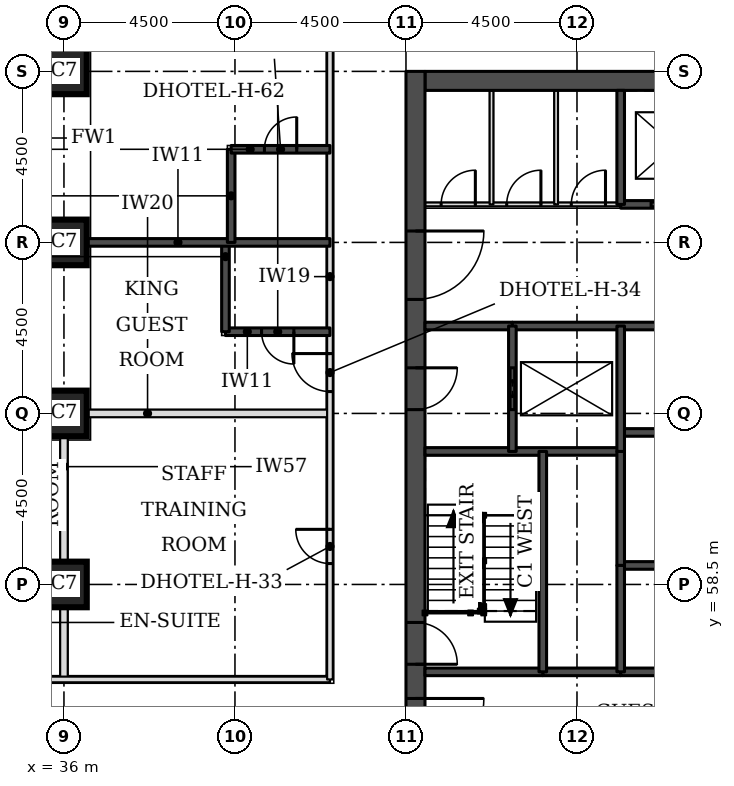
"""IFC4 building model, lengths in metres.
Left out: names, types, materials, properties, quantities, classifications, styles, units other than length and angle.
Written with IfcOpenShell. Run it as: python <this file> out.ifc"""

import sys

from ifc_helpers import new_model, si_unit, direction, frame, frame_2d, origin, origin_2d, place, context, subcontext, project, spatial, rectangle, extrude, element, fill, save


model = new_model("IFC4")
c1 = context("Model", 3, precision=1e-05, world=origin(), true_north=direction((0.0, 1.0)))
c2 = subcontext(c1, "Body", "Model", "MODEL_VIEW")
j1 = project(units=[si_unit("LENGTHUNIT", "METRE"), si_unit("PLANEANGLEUNIT", "RADIAN")], contexts=[c1])
p1 = place(None, origin())
s1 = spatial("IfcSite", under=j1, at=p1, CompositionType="ELEMENT")
p2 = place(p1, origin())
s2 = spatial("IfcBuilding", under=s1, at=p2, CompositionType="ELEMENT")
p3 = place(p2, frame((0.0, 0.0, 46.2)))
s3 = spatial("IfcBuildingStorey", under=s2, at=p3, CompositionType="ELEMENT", Elevation=46.2)
for number, where, z_axis, x_axis in (
    (1, (36.0, 58.5, 0.0), (0.0, 0.0, 1.0), (1.0, 0.0, 0.0)),
    (2, (36.0, 63.0, 0.0), (0.0, 0.0, 1.0), (1.0, 0.0, 0.0)),
    (3, (36.0, 67.5, 0.0), (0.0, 0.0, 1.0), (1.0, 0.0, 0.0)),
    (4, (36.0, 72.0, 0.0), (0.0, 0.0, 1.0), (1.0, 0.0, 0.0)),
):
    element("IfcColumn", number, at=place(p3, frame(where, z_axis=z_axis, x_axis=x_axis)), inside=s3, PredefinedType="COLUMN", context=c2, shape_type="SweptSolid", body=[
        extrude(rectangle(XDim=1.2, YDim=1.2, at=origin_2d()), origin(), (0.0, 0.0, 1.0), 3.3),
    ])
p4 = place(p3, frame((45.5, 71.75, 0.0), z_axis=(0.0, 0.0, 1.0), x_axis=(1.0, 0.0, 0.0)))
e5 = element("IfcWall", 5, at=p4, inside=s3, PredefinedType="SHEAR", context=c2, shape_type="SweptSolid", body=[
    extrude(rectangle(XDim=21.5, YDim=0.5, at=frame_2d((10.75, 0.0))), origin(), (0.0, 0.0, 1.0), 3.3),
])
p5 = place(p3, frame((45.25, 49.5, 0.0), z_axis=(0.0, 0.0, 1.0), x_axis=(0.0, 1.0, 0.0)))
e6 = element("IfcWall", 6, at=p5, inside=s3, PredefinedType="SHEAR", context=c2, shape_type="SweptSolid", body=[
    extrude(rectangle(XDim=22.5, YDim=0.5, at=frame_2d((11.25, 0.0))), origin(), (0.0, 0.0, 1.0), 3.3),
])
p6 = place(p5, frame((4.2, 0.0, 0.0)))
e7 = element("IfcOpeningElement", 7, at=p6, cuts=e6, PredefinedType="OPENING", context=c2, shape_type="SweptSolid", body=[
    extrude(rectangle(XDim=1.8, YDim=2.1, at=frame_2d((0.9, 1.05))), frame((0.0, 0.26, 0.0), z_axis=(0.0, -1.0, 0.0), x_axis=(1.0, 0.0, 0.0)), (0.0, 0.0, 1.0), 0.52),
])
p7 = place(p5, frame((6.9, 0.0, 0.0)))
e8 = element("IfcOpeningElement", 8, at=p7, cuts=e6, PredefinedType="OPENING", context=c2, shape_type="SweptSolid", body=[
    extrude(rectangle(XDim=1.1, YDim=2.1, at=frame_2d((0.55, 1.05))), frame((0.0, 0.26, 0.0), z_axis=(0.0, -1.0, 0.0), x_axis=(1.0, 0.0, 0.0)), (0.0, 0.0, 1.0), 0.52),
])
p8 = place(p5, frame((13.6, 0.0, 0.0)))
e9 = element("IfcOpeningElement", 9, at=p8, cuts=e6, PredefinedType="OPENING", context=c2, shape_type="SweptSolid", body=[
    extrude(rectangle(XDim=1.1, YDim=2.1, at=frame_2d((0.55, 1.05))), frame((0.0, 0.26, 0.0), z_axis=(0.0, -1.0, 0.0), x_axis=(1.0, 0.0, 0.0)), (0.0, 0.0, 1.0), 0.52),
])
p9 = place(p5, frame((16.5, 0.0, 0.0)))
e10 = element("IfcOpeningElement", 10, at=p9, cuts=e6, PredefinedType="OPENING", context=c2, shape_type="SweptSolid", body=[
    extrude(rectangle(XDim=1.8, YDim=2.1, at=frame_2d((0.9, 1.05))), frame((0.0, 0.26, 0.0), z_axis=(0.0, -1.0, 0.0), x_axis=(1.0, 0.0, 0.0)), (0.0, 0.0, 1.0), 0.52),
])
p10 = place(p3, frame((36.0, 56.0, 0.0), z_axis=(0.0, 0.0, 1.0), x_axis=(0.0, 1.0, 0.0)))
e11 = element("IfcWall", 11, at=p10, inside=s3, PredefinedType="PARTITIONING", context=c2, shape_type="SweptSolid", body=[
    extrude(rectangle(XDim=6.4, YDim=0.2, at=frame_2d((3.2, 0.0))), origin(), (0.0, 0.0, 1.0), 2.33),
])
p11 = place(p3, frame((36.6, 63.0, 0.0), z_axis=(0.0, 0.0, 1.0), x_axis=(1.0, 0.0, 0.0)))
e12 = element("IfcWall", 12, at=p11, inside=s3, PredefinedType="PARTITIONING", context=c2, shape_type="SweptSolid", body=[
    extrude(rectangle(XDim=6.4, YDim=0.2, at=frame_2d((3.2, 0.0))), origin(), (0.0, 0.0, 1.0), 3.08),
])
p12 = place(p3, frame((27.0, 56.0, 0.0), z_axis=(0.0, 0.0, 1.0), x_axis=(1.0, 0.0, 0.0)))
e13 = element("IfcWall", 13, at=p12, inside=s3, PredefinedType="PARTITIONING", context=c2, shape_type="SweptSolid", body=[
    extrude(rectangle(XDim=16.0, YDim=0.15, at=frame_2d((8.0, 0.0))), origin(), (0.0, 0.0, 1.0), 3.08),
])
p13 = place(p12, frame((7.425, 0.0, 0.0)))
e14 = element("IfcOpeningElement", 14, at=p13, cuts=e13, PredefinedType="OPENING", context=c2, shape_type="SweptSolid", body=[
    extrude(rectangle(XDim=1.0, YDim=2.1, at=frame_2d((0.5, 1.05))), frame((0.0, 0.085, 0.0), z_axis=(0.0, -1.0, 0.0), x_axis=(1.0, 0.0, 0.0)), (0.0, 0.0, 1.0), 0.17),
])
p14 = place(p12, frame((1.91, 0.0, 0.0)))
e15 = element("IfcOpeningElement", 15, at=p14, cuts=e13, PredefinedType="OPENING", context=c2, shape_type="SweptSolid", body=[
    extrude(rectangle(XDim=0.9, YDim=2.1, at=frame_2d((0.45, 1.05))), frame((0.0, 0.085, 0.0), z_axis=(0.0, -1.0, 0.0), x_axis=(1.0, 0.0, 0.0)), (0.0, 0.0, 1.0), 0.17),
])
p15 = place(p3, frame((43.0, 56.0, 0.0), z_axis=(0.0, 0.0, 1.0), x_axis=(0.0, 1.0, 0.0)))
e16 = element("IfcWall", 16, at=p15, inside=s3, PredefinedType="PARTITIONING", context=c2, shape_type="SweptSolid", body=[
    extrude(rectangle(XDim=18.0, YDim=0.15, at=frame_2d((9.0, 0.0))), origin(), (0.0, 0.0, 1.0), 3.08),
])
p16 = place(p15, frame((7.575, 0.0, 0.0)))
e17 = element("IfcOpeningElement", 17, at=p16, cuts=e16, PredefinedType="OPENING", context=c2, shape_type="SweptSolid", body=[
    extrude(rectangle(XDim=1.0, YDim=2.1, at=frame_2d((0.5, 1.05))), frame((0.0, 0.085, 0.0), z_axis=(0.0, -1.0, 0.0), x_axis=(1.0, 0.0, 0.0)), (0.0, 0.0, 1.0), 0.17),
])
p17 = place(p15, frame((16.553, 0.0, 0.0)))
e18 = element("IfcOpeningElement", 18, at=p17, cuts=e16, PredefinedType="OPENING", context=c2, shape_type="SweptSolid", body=[
    extrude(rectangle(XDim=1.0, YDim=2.1, at=frame_2d((0.5, 1.05))), frame((0.0, 0.085, 0.0), z_axis=(0.0, -1.0, 0.0), x_axis=(1.0, 0.0, 0.0)), (0.0, 0.0, 1.0), 0.17),
])
p18 = place(p15, frame((3.05, 0.0, 0.0)))
e19 = element("IfcOpeningElement", 19, at=p18, cuts=e16, PredefinedType="OPENING", context=c2, shape_type="SweptSolid", body=[
    extrude(rectangle(XDim=0.9, YDim=2.1, at=frame_2d((0.45, 1.05))), frame((0.0, 0.085, 0.0), z_axis=(0.0, -1.0, 0.0), x_axis=(1.0, 0.0, 0.0)), (0.0, 0.0, 1.0), 0.17),
])
p19 = place(p3, frame((40.25, 65.15, 0.0), z_axis=(0.0, 0.0, 1.0), x_axis=(1.0, 0.0, 0.0)))
e20 = element("IfcWall", 20, at=p19, inside=s3, PredefinedType="SOLIDWALL", context=c2, shape_type="SweptSolid", body=[
    extrude(rectangle(XDim=2.75, YDim=0.2, at=frame_2d((1.375, 0.0))), origin(), (0.0, 0.0, 1.0), 3.08),
])
p20 = place(p19, frame((0.95, 0.0, 0.0)))
e21 = element("IfcOpeningElement", 21, at=p20, cuts=e20, PredefinedType="OPENING", context=c2, shape_type="SweptSolid", body=[
    extrude(rectangle(XDim=0.85, YDim=2.1, at=frame_2d((0.425, 1.05))), frame((0.0, 0.11, 0.0), z_axis=(0.0, -1.0, 0.0), x_axis=(1.0, 0.0, 0.0)), (0.0, 0.0, 1.0), 0.22),
])
p21 = place(p3, frame((40.25, 65.15, 0.0), z_axis=(0.0, 0.0, 1.0), x_axis=(0.0, 1.0, 0.0)))
e22 = element("IfcWall", 22, at=p21, inside=s3, PredefinedType="SOLIDWALL", context=c2, shape_type="SweptSolid", body=[
    extrude(rectangle(XDim=2.35, YDim=0.2, at=frame_2d((1.175, 0.0))), origin(), (0.0, 0.0, 1.0), 3.08),
])
p22 = place(p3, frame((36.6, 67.5, 0.0), z_axis=(0.0, 0.0, 1.0), x_axis=(1.0, 0.0, 0.0)))
e23 = element("IfcWall", 23, at=p22, inside=s3, PredefinedType="SOLIDWALL", context=c2, shape_type="SweptSolid", body=[
    extrude(rectangle(XDim=6.4, YDim=0.2, at=frame_2d((3.2, 0.0))), origin(), (0.0, 0.0, 1.0), 3.08),
])
p23 = place(p3, frame((40.4, 67.5, 0.0), z_axis=(0.0, 0.0, 1.0), x_axis=(0.0, 1.0, 0.0)))
e24 = element("IfcWall", 24, at=p23, inside=s3, PredefinedType="SOLIDWALL", context=c2, shape_type="SweptSolid", body=[
    extrude(rectangle(XDim=2.45, YDim=0.2, at=frame_2d((1.225, 0.0))), origin(), (0.0, 0.0, 1.0), 3.08),
])
p24 = place(p3, frame((40.4, 69.95, 0.0), z_axis=(0.0, 0.0, 1.0), x_axis=(1.0, 0.0, 0.0)))
e25 = element("IfcWall", 25, at=p24, inside=s3, PredefinedType="SOLIDWALL", context=c2, shape_type="SweptSolid", body=[
    extrude(rectangle(XDim=2.6, YDim=0.2, at=frame_2d((1.3, 0.0))), origin(), (0.0, 0.0, 1.0), 3.08),
])
p25 = place(p24, frame((0.875, 0.0, 0.0)))
e26 = element("IfcOpeningElement", 26, at=p25, cuts=e25, PredefinedType="OPENING", context=c2, shape_type="SweptSolid", body=[
    extrude(rectangle(XDim=0.85, YDim=2.1, at=frame_2d((0.425, 1.05))), frame((0.0, 0.11, 0.0), z_axis=(0.0, -1.0, 0.0), x_axis=(1.0, 0.0, 0.0)), (0.0, 0.0, 1.0), 0.22),
])
p26 = place(p3, frame((48.6, 56.2, 0.0), z_axis=(0.0, 0.0, 1.0), x_axis=(1.0, 0.0, 0.0)))
e27 = element("IfcWall", 27, at=p26, inside=s3, PredefinedType="SOLIDWALL", context=c2, shape_type="SweptSolid", body=[
    extrude(rectangle(XDim=2.05, YDim=0.2, at=frame_2d((1.025, 0.0))), origin(), (0.0, 0.0, 1.0), 3.08),
])
p27 = place(p3, frame((45.5, 56.2, 0.0), z_axis=(0.0, 0.0, 1.0), x_axis=(1.0, 0.0, 0.0)))
e28 = element("IfcWall", 28, at=p27, inside=s3, PredefinedType="SOLIDWALL", context=c2, shape_type="SweptSolid", body=[
    extrude(rectangle(XDim=3.1, YDim=0.2, at=frame_2d((1.55, 0.0))), origin(), (0.0, 0.0, 1.0), 3.08),
])
p28 = place(p3, frame((50.65, 56.2, 0.0), z_axis=(0.0, 0.0, 1.0), x_axis=(1.0, 0.0, 0.0)))
e29 = element("IfcWall", 29, at=p28, inside=s3, PredefinedType="SOLIDWALL", context=c2, shape_type="SweptSolid", body=[
    extrude(rectangle(XDim=11.2, YDim=0.2, at=frame_2d((5.6, 0.0))), origin(), (0.0, 0.0, 1.0), 3.08),
])
p29 = place(p3, frame((50.65, 59.0, 0.0), z_axis=(0.0, 0.0, 1.0), x_axis=(1.0, 0.0, 0.0)))
e30 = element("IfcWall", 30, at=p29, inside=s3, PredefinedType="SOLIDWALL", context=c2, shape_type="SweptSolid", body=[
    extrude(rectangle(XDim=11.2, YDim=0.2, at=frame_2d((5.6, 0.0))), origin(), (0.0, 0.0, 1.0), 3.3),
])
p30 = place(p3, frame((45.5, 62.0, 0.0), z_axis=(0.0, 0.0, 1.0), x_axis=(1.0, 0.0, 0.0)))
e31 = element("IfcWall", 31, at=p30, inside=s3, PredefinedType="SOLIDWALL", context=c2, shape_type="SweptSolid", body=[
    extrude(rectangle(XDim=5.15, YDim=0.2, at=frame_2d((2.575, 0.0))), origin(), (0.0, 0.0, 1.0), 3.08),
])
p31 = place(p3, frame((50.65, 62.5, 0.0), z_axis=(0.0, 0.0, 1.0), x_axis=(1.0, 0.0, 0.0)))
e32 = element("IfcWall", 32, at=p31, inside=s3, PredefinedType="SOLIDWALL", context=c2, shape_type="SweptSolid", body=[
    extrude(rectangle(XDim=11.2, YDim=0.2, at=frame_2d((5.6, 0.0))), origin(), (0.0, 0.0, 1.0), 3.3),
])
p32 = place(p3, frame((45.5, 65.3, 0.0), z_axis=(0.0, 0.0, 1.0), x_axis=(1.0, 0.0, 0.0)))
e33 = element("IfcWall", 33, at=p32, inside=s3, PredefinedType="SOLIDWALL", context=c2, shape_type="SweptSolid", body=[
    extrude(rectangle(XDim=2.3, YDim=0.2, at=frame_2d((1.15, 0.0))), origin(), (0.0, 0.0, 1.0), 3.08),
])
p33 = place(p3, frame((47.8, 65.3, 0.0), z_axis=(0.0, 0.0, 1.0), x_axis=(1.0, 0.0, 0.0)))
e34 = element("IfcWall", 34, at=p33, inside=s3, PredefinedType="SOLIDWALL", context=c2, shape_type="SweptSolid", body=[
    extrude(rectangle(XDim=16.9, YDim=0.2, at=frame_2d((8.45, 0.0))), origin(), (0.0, 0.0, 1.0), 3.08),
])
p34 = place(p3, frame((45.5, 68.5, 0.0), z_axis=(0.0, 0.0, 1.0), x_axis=(1.0, 0.0, 0.0)))
e35 = element("IfcWall", 35, at=p34, inside=s3, PredefinedType="PARTITIONING", context=c2, shape_type="SweptSolid", body=[
    extrude(rectangle(XDim=5.15, YDim=0.1, at=frame_2d((2.575, 0.0))), origin(), (0.0, 0.0, 1.0), 3.08),
])
p35 = place(p34, frame((0.426, 0.0, 0.0)))
e36 = element("IfcOpeningElement", 36, at=p35, cuts=e35, PredefinedType="OPENING", context=c2, shape_type="SweptSolid", body=[
    extrude(rectangle(XDim=0.9, YDim=2.1, at=frame_2d((0.45, 1.05))), frame((0.0, 0.06, 0.0), z_axis=(0.0, -1.0, 0.0), x_axis=(1.0, 0.0, 0.0)), (0.0, 0.0, 1.0), 0.12),
])
p36 = place(p34, frame((2.151, 0.0, 0.0)))
e37 = element("IfcOpeningElement", 37, at=p36, cuts=e35, PredefinedType="OPENING", context=c2, shape_type="SweptSolid", body=[
    extrude(rectangle(XDim=0.9, YDim=2.1, at=frame_2d((0.45, 1.05))), frame((0.0, 0.06, 0.0), z_axis=(0.0, -1.0, 0.0), x_axis=(1.0, 0.0, 0.0)), (0.0, 0.0, 1.0), 0.12),
])
p37 = place(p34, frame((3.85, 0.0, 0.0)))
e38 = element("IfcOpeningElement", 38, at=p37, cuts=e35, PredefinedType="OPENING", context=c2, shape_type="SweptSolid", body=[
    extrude(rectangle(XDim=0.9, YDim=2.1, at=frame_2d((0.45, 1.05))), frame((0.0, 0.06, 0.0), z_axis=(0.0, -1.0, 0.0), x_axis=(1.0, 0.0, 0.0)), (0.0, 0.0, 1.0), 0.12),
])
p38 = place(p3, frame((50.65, 68.5, 0.0), z_axis=(0.0, 0.0, 1.0), x_axis=(1.0, 0.0, 0.0)))
e39 = element("IfcWall", 39, at=p38, inside=s3, PredefinedType="SOLIDWALL", context=c2, shape_type="SweptSolid", body=[
    extrude(rectangle(XDim=11.2, YDim=0.2, at=frame_2d((5.6, 0.0))), origin(), (0.0, 0.0, 1.0), 3.08),
])
p39 = place(p38, frame((0.8, 0.0, 0.0)))
e40 = element("IfcOpeningElement", 40, at=p39, cuts=e39, PredefinedType="OPENING", context=c2, shape_type="SweptSolid", body=[
    extrude(rectangle(XDim=1.2, YDim=2.1, at=frame_2d((0.6, 1.05))), frame((0.0, 0.11, 0.0), z_axis=(0.0, -1.0, 0.0), x_axis=(1.0, 0.0, 0.0)), (0.0, 0.0, 1.0), 0.22),
])
p40 = place(p38, frame((3.6, 0.0, 0.0)))
e41 = element("IfcOpeningElement", 41, at=p40, cuts=e39, PredefinedType="OPENING", context=c2, shape_type="SweptSolid", body=[
    extrude(rectangle(XDim=1.2, YDim=2.1, at=frame_2d((0.6, 1.05))), frame((0.0, 0.11, 0.0), z_axis=(0.0, -1.0, 0.0), x_axis=(1.0, 0.0, 0.0)), (0.0, 0.0, 1.0), 0.22),
])
p41 = place(p38, frame((6.4, 0.0, 0.0)))
e42 = element("IfcOpeningElement", 42, at=p41, cuts=e39, PredefinedType="OPENING", context=c2, shape_type="SweptSolid", body=[
    extrude(rectangle(XDim=1.2, YDim=2.1, at=frame_2d((0.6, 1.05))), frame((0.0, 0.11, 0.0), z_axis=(0.0, -1.0, 0.0), x_axis=(1.0, 0.0, 0.0)), (0.0, 0.0, 1.0), 0.22),
])
p42 = place(p38, frame((9.2, 0.0, 0.0)))
e43 = element("IfcOpeningElement", 43, at=p42, cuts=e39, PredefinedType="OPENING", context=c2, shape_type="SweptSolid", body=[
    extrude(rectangle(XDim=1.2, YDim=2.1, at=frame_2d((0.6, 1.05))), frame((0.0, 0.11, 0.0), z_axis=(0.0, -1.0, 0.0), x_axis=(1.0, 0.0, 0.0)), (0.0, 0.0, 1.0), 0.22),
])
p43 = place(p3, frame((47.251, 68.5, 0.0), z_axis=(0.0, 0.0, 1.0), x_axis=(0.0, 1.0, 0.0)))
e44 = element("IfcWall", 44, at=p43, inside=s3, PredefinedType="PARTITIONING", context=c2, shape_type="SweptSolid", body=[
    extrude(rectangle(XDim=3.0, YDim=0.1, at=frame_2d((1.5, 0.0))), origin(), (0.0, 0.0, 1.0), 3.08),
])
p44 = place(p3, frame((47.8, 62.0, 0.0), z_axis=(0.0, 0.0, 1.0), x_axis=(0.0, 1.0, 0.0)))
e45 = element("IfcWall", 45, at=p44, inside=s3, PredefinedType="SOLIDWALL", context=c2, shape_type="SweptSolid", body=[
    extrude(rectangle(XDim=3.3, YDim=0.2, at=frame_2d((1.65, 0.0))), origin(), (0.0, 0.0, 1.0), 3.08),
])
p45 = place(p44, frame((1.1, 0.0, 0.0)))
e46 = element("IfcOpeningElement", 46, at=p45, cuts=e45, PredefinedType="OPENING", context=c2, shape_type="SweptSolid", body=[
    extrude(rectangle(XDim=1.1, YDim=2.1, at=frame_2d((0.55, 1.05))), frame((0.0, 0.11, 0.0), z_axis=(0.0, -1.0, 0.0), x_axis=(1.0, 0.0, 0.0)), (0.0, 0.0, 1.0), 0.22),
])
p46 = place(p3, frame((48.6, 56.2, 0.0), z_axis=(0.0, 0.0, 1.0), x_axis=(0.0, 1.0, 0.0)))
e47 = element("IfcWall", 47, at=p46, inside=s3, PredefinedType="SOLIDWALL", context=c2, shape_type="SweptSolid", body=[
    extrude(rectangle(XDim=5.8, YDim=0.2, at=frame_2d((2.9, 0.0))), origin(), (0.0, 0.0, 1.0), 3.08),
])
p47 = place(p3, frame((48.95, 68.5, 0.0), z_axis=(0.0, 0.0, 1.0), x_axis=(0.0, 1.0, 0.0)))
e48 = element("IfcWall", 48, at=p47, inside=s3, PredefinedType="PARTITIONING", context=c2, shape_type="SweptSolid", body=[
    extrude(rectangle(XDim=3.0, YDim=0.1, at=frame_2d((1.5, 0.0))), origin(), (0.0, 0.0, 1.0), 3.08),
])
p48 = place(p3, frame((50.65, 59.0, 0.0), z_axis=(0.0, 0.0, 1.0), x_axis=(0.0, 1.0, 0.0)))
e49 = element("IfcWall", 49, at=p48, inside=s3, PredefinedType="SOLIDWALL", context=c2, shape_type="SweptSolid", body=[
    extrude(rectangle(XDim=3.0, YDim=0.2, at=frame_2d((1.5, 0.0))), origin(), (0.0, 0.0, 1.0), 3.3),
])
p49 = place(p3, frame((50.65, 56.2, 0.0), z_axis=(0.0, 0.0, 1.0), x_axis=(0.0, 1.0, 0.0)))
e50 = element("IfcWall", 50, at=p49, inside=s3, PredefinedType="SOLIDWALL", context=c2, shape_type="SweptSolid", body=[
    extrude(rectangle(XDim=2.8, YDim=0.2, at=frame_2d((1.4, 0.0))), origin(), (0.0, 0.0, 1.0), 3.08),
])
p50 = place(p3, frame((50.65, 62.0, 0.0), z_axis=(0.0, 0.0, 1.0), x_axis=(0.0, 1.0, 0.0)))
e51 = element("IfcWall", 51, at=p50, inside=s3, PredefinedType="SOLIDWALL", context=c2, shape_type="SweptSolid", body=[
    extrude(rectangle(XDim=3.3, YDim=0.2, at=frame_2d((1.65, 0.0))), origin(), (0.0, 0.0, 1.0), 3.08),
])
p51 = place(p3, frame((50.65, 68.5, 0.0), z_axis=(0.0, 0.0, 1.0), x_axis=(0.0, 1.0, 0.0)))
e52 = element("IfcWall", 52, at=p51, inside=s3, PredefinedType="SOLIDWALL", context=c2, shape_type="SweptSolid", body=[
    extrude(rectangle(XDim=3.0, YDim=0.2, at=frame_2d((1.5, 0.0))), origin(), (0.0, 0.0, 1.0), 3.08),
])
p52 = place(p16, origin())
e53 = element("IfcDoor", 53, at=p52, inside=s3, OperationType="SINGLE_SWING_RIGHT", PredefinedType="DOOR", context=c2, shape_type="SweptSolid", body=[
    extrude(rectangle(XDim=1.0, YDim=2.1, at=frame_2d((0.5, 1.05))), frame((0.0, 0.025, 0.0), z_axis=(0.0, -1.0, 0.0), x_axis=(1.0, 0.0, 0.0)), (0.0, 0.0, 1.0), 0.05),
])
fill(e17, e53)
p53 = place(p20, frame((0.85, 0.0, 0.0), z_axis=(0.0, 0.0, 1.0), x_axis=(-1.0, 0.0, 0.0)))
e54 = element("IfcDoor", 54, at=p53, inside=s3, OperationType="SINGLE_SWING_LEFT", PredefinedType="DOOR", context=c2, shape_type="SweptSolid", body=[
    extrude(rectangle(XDim=0.85, YDim=2.1, at=frame_2d((0.425, 1.05))), frame((0.0, 0.025, 0.0), z_axis=(0.0, -1.0, 0.0), x_axis=(1.0, 0.0, 0.0)), (0.0, 0.0, 1.0), 0.05),
])
fill(e21, e54)
p54 = place(p25, origin())
e55 = element("IfcDoor", 55, at=p54, inside=s3, OperationType="SINGLE_SWING_RIGHT", PredefinedType="DOOR", context=c2, shape_type="SweptSolid", body=[
    extrude(rectangle(XDim=0.85, YDim=2.1, at=frame_2d((0.425, 1.05))), frame((0.0, 0.025, 0.0), z_axis=(0.0, -1.0, 0.0), x_axis=(1.0, 0.0, 0.0)), (0.0, 0.0, 1.0), 0.05),
])
fill(e26, e55)
p55 = place(p18, origin())
e56 = element("IfcDoor", 56, at=p55, inside=s3, OperationType="SINGLE_SWING_RIGHT", PredefinedType="DOOR", context=c2, shape_type="SweptSolid", body=[
    extrude(rectangle(XDim=0.9, YDim=2.1, at=frame_2d((0.45, 1.05))), frame((0.0, 0.025, 0.0), z_axis=(0.0, -1.0, 0.0), x_axis=(1.0, 0.0, 0.0)), (0.0, 0.0, 1.0), 0.05),
])
fill(e19, e56)
p56 = place(p39, origin())
e57 = element("IfcDoor", 57, at=p56, inside=s3, OperationType="DOUBLE_DOOR_SLIDING", PredefinedType="DOOR", context=c2, shape_type="SweptSolid", body=[
    extrude(rectangle(XDim=1.2, YDim=2.1, at=frame_2d((0.6, 1.05))), frame((0.0, 0.025, 0.0), z_axis=(0.0, -1.0, 0.0), x_axis=(1.0, 0.0, 0.0)), (0.0, 0.0, 1.0), 0.05),
])
fill(e40, e57)
p57 = place(p45, origin())
e58 = element("IfcDoor", 58, at=p57, inside=s3, OperationType="DOUBLE_DOOR_SLIDING", PredefinedType="DOOR", context=c2, shape_type="SweptSolid", body=[
    extrude(rectangle(XDim=1.1, YDim=2.1, at=frame_2d((0.55, 1.05))), frame((0.0, 0.025, 0.0), z_axis=(0.0, -1.0, 0.0), x_axis=(1.0, 0.0, 0.0)), (0.0, 0.0, 1.0), 0.05),
])
fill(e46, e58)
p58 = place(p6, frame((1.8, 0.0, 0.0), z_axis=(0.0, 0.0, 1.0), x_axis=(-1.0, 0.0, 0.0)))
e59 = element("IfcDoor", 59, at=p58, inside=s3, OperationType="SINGLE_SWING_LEFT", PredefinedType="DOOR", context=c2, shape_type="SweptSolid", body=[
    extrude(rectangle(XDim=1.8, YDim=2.1, at=frame_2d((0.9, 1.05))), frame((0.0, 0.025, 0.0), z_axis=(0.0, -1.0, 0.0), x_axis=(1.0, 0.0, 0.0)), (0.0, 0.0, 1.0), 0.05),
])
fill(e7, e59)
p59 = place(p7, frame((1.1, 0.0, 0.0), z_axis=(0.0, 0.0, 1.0), x_axis=(-1.0, 0.0, 0.0)))
e60 = element("IfcDoor", 60, at=p59, inside=s3, OperationType="SINGLE_SWING_RIGHT", PredefinedType="DOOR", context=c2, shape_type="SweptSolid", body=[
    extrude(rectangle(XDim=1.1, YDim=2.1, at=frame_2d((0.55, 1.05))), frame((0.0, 0.025, 0.0), z_axis=(0.0, -1.0, 0.0), x_axis=(1.0, 0.0, 0.0)), (0.0, 0.0, 1.0), 0.05),
])
fill(e8, e60)
p60 = place(p8, frame((1.1, 0.0, 0.0), z_axis=(0.0, 0.0, 1.0), x_axis=(-1.0, 0.0, 0.0)))
e61 = element("IfcDoor", 61, at=p60, inside=s3, OperationType="SINGLE_SWING_LEFT", PredefinedType="DOOR", context=c2, shape_type="SweptSolid", body=[
    extrude(rectangle(XDim=1.1, YDim=2.1, at=frame_2d((0.55, 1.05))), frame((0.0, 0.025, 0.0), z_axis=(0.0, -1.0, 0.0), x_axis=(1.0, 0.0, 0.0)), (0.0, 0.0, 1.0), 0.05),
])
fill(e9, e61)
p61 = place(p9, frame((1.8, 0.0, 0.0), z_axis=(0.0, 0.0, 1.0), x_axis=(-1.0, 0.0, 0.0)))
e62 = element("IfcDoor", 62, at=p61, inside=s3, OperationType="SINGLE_SWING_LEFT", PredefinedType="DOOR", context=c2, shape_type="SweptSolid", body=[
    extrude(rectangle(XDim=1.8, YDim=2.1, at=frame_2d((0.9, 1.05))), frame((0.0, 0.025, 0.0), z_axis=(0.0, -1.0, 0.0), x_axis=(1.0, 0.0, 0.0)), (0.0, 0.0, 1.0), 0.05),
])
fill(e10, e62)
p62 = place(p35, origin())
e63 = element("IfcDoor", 63, at=p62, inside=s3, OperationType="SINGLE_SWING_RIGHT", PredefinedType="DOOR", context=c2, shape_type="SweptSolid", body=[
    extrude(rectangle(XDim=0.9, YDim=2.1, at=frame_2d((0.45, 1.05))), frame((0.0, 0.025, 0.0), z_axis=(0.0, -1.0, 0.0), x_axis=(1.0, 0.0, 0.0)), (0.0, 0.0, 1.0), 0.05),
])
fill(e36, e63)
p63 = place(p36, origin())
e64 = element("IfcDoor", 64, at=p63, inside=s3, OperationType="SINGLE_SWING_RIGHT", PredefinedType="DOOR", context=c2, shape_type="SweptSolid", body=[
    extrude(rectangle(XDim=0.9, YDim=2.1, at=frame_2d((0.45, 1.05))), frame((0.0, 0.025, 0.0), z_axis=(0.0, -1.0, 0.0), x_axis=(1.0, 0.0, 0.0)), (0.0, 0.0, 1.0), 0.05),
])
fill(e37, e64)
p64 = place(p37, origin())
e65 = element("IfcDoor", 65, at=p64, inside=s3, OperationType="SINGLE_SWING_RIGHT", PredefinedType="DOOR", context=c2, shape_type="SweptSolid", body=[
    extrude(rectangle(XDim=0.9, YDim=2.1, at=frame_2d((0.45, 1.05))), frame((0.0, 0.025, 0.0), z_axis=(0.0, -1.0, 0.0), x_axis=(1.0, 0.0, 0.0)), (0.0, 0.0, 1.0), 0.05),
])
fill(e38, e65)
save(model, sys.argv[1])
